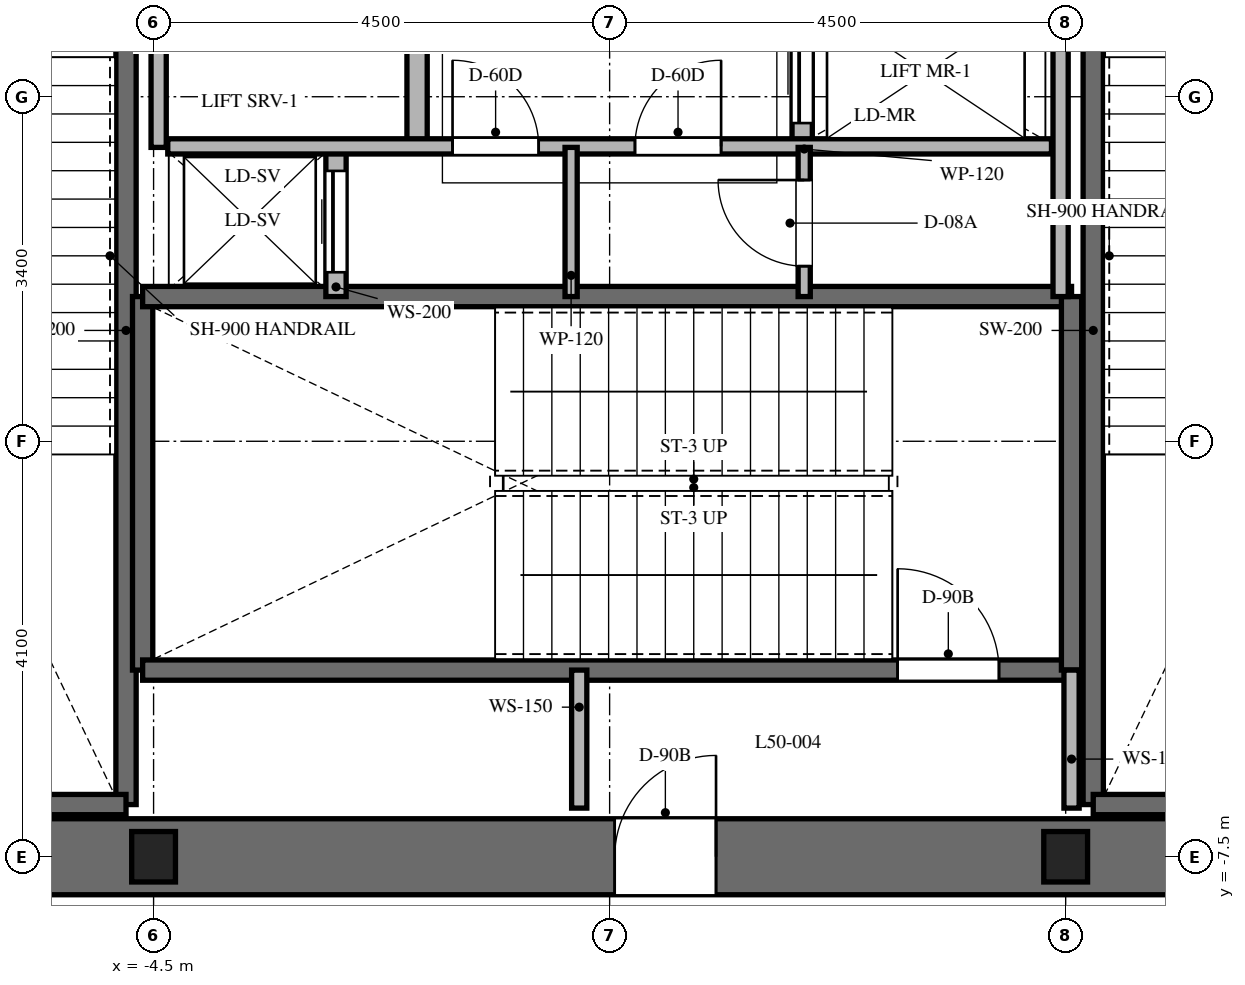
"""IFC4 building model, lengths in metres.
Left out: names, types, materials, properties, quantities, classifications, styles, units other than length and angle.
Written with IfcOpenShell. Run it as: python <this file> out.ifc"""

import sys

from ifc_helpers import new_model, si_unit, direction, frame, frame_2d, origin, origin_2d, place, context, subcontext, project, spatial, rectangle, i_section, extrude, element, fill, save


model = new_model("IFC4")
c1 = context("Model", 3, precision=1e-05, world=origin(), true_north=direction((0.0, 1.0)))
c2 = subcontext(c1, "Body", "Model", "MODEL_VIEW")
j1 = project(units=[si_unit("LENGTHUNIT", "METRE"), si_unit("PLANEANGLEUNIT", "RADIAN")], contexts=[c1])
p1 = place(None, origin())
s1 = spatial("IfcSite", under=j1, at=p1, CompositionType="ELEMENT")
p2 = place(p1, origin())
s2 = spatial("IfcBuilding", under=s1, at=p2, CompositionType="ELEMENT")
p3 = place(p2, frame((0.0, 0.0, 201.5)))
s3 = spatial("IfcBuildingStorey", under=s2, at=p3, CompositionType="ELEMENT", Elevation=201.5)
p4 = place(p3, frame((-9.375, -7.5, 0.0), z_axis=(0.0, 0.0, 1.0), x_axis=(1.0, 0.0, 0.0)))
e1 = element("IfcWall", 1, at=p4, inside=s3, PredefinedType="SHEAR", context=c2, shape_type="SweptSolid", body=[
    extrude(rectangle(XDim=18.75, YDim=0.75, at=frame_2d((9.375, 0.0))), origin(), (0.0, 0.0, 1.0), 5.0),
])
p5 = place(p4, frame((9.425, 0.0, 0.0)))
e2 = element("IfcOpeningElement", 2, at=p5, cuts=e1, PredefinedType="OPENING", context=c2, shape_type="SweptSolid", body=[
    extrude(rectangle(XDim=1.0, YDim=2.15, at=frame_2d((0.5, 1.075))), frame((0.0, 0.385, 0.0), z_axis=(0.0, -1.0, 0.0), x_axis=(1.0, 0.0, 0.0)), (0.0, 0.0, 1.0), 0.77),
])
p6 = place(p3, frame((-4.772, -6.985, 0.0), z_axis=(0.0, 0.0, 1.0), x_axis=(0.0, 1.0, 0.0)))
e3 = element("IfcWall", 3, at=p6, inside=s3, PredefinedType="SHEAR", context=c2, shape_type="SweptSolid", body=[
    extrude(rectangle(XDim=9.143, YDim=0.2, at=frame_2d((4.572, 0.0))), origin(), (0.0, 0.0, 1.0), 5.0),
])
p7 = place(p3, frame((-8.458, -6.985, 0.0), z_axis=(0.0, 0.0, 1.0), x_axis=(1.0, 0.0, 0.0)))
e4 = element("IfcWall", 4, at=p7, inside=s3, PredefinedType="SHEAR", context=c2, shape_type="SweptSolid", body=[
    extrude(rectangle(XDim=3.686, YDim=0.2, at=frame_2d((1.843, 0.0))), origin(), (0.0, 0.0, 1.0), 5.0),
])
p8 = place(p3, frame((4.772, -6.985, 0.0), z_axis=(0.0, 0.0, 1.0), x_axis=(0.0, 1.0, 0.0)))
e5 = element("IfcWall", 5, at=p8, inside=s3, PredefinedType="SHEAR", context=c2, shape_type="SweptSolid", body=[
    extrude(rectangle(XDim=9.143, YDim=0.2, at=frame_2d((4.572, 0.0))), origin(), (0.0, 0.0, 1.0), 5.0),
])
for number, where, z_axis, x_axis in (
    (6, (4.772, -6.985, 0.0), (0.0, 0.0, 1.0), (1.0, 0.0, 0.0)),
    (7, (-4.608, -5.658, 0.0), (0.0, 0.0, 1.0), (0.0, 1.0, 0.0)),
):
    element("IfcWall", number, at=place(p3, frame(where, z_axis=z_axis, x_axis=x_axis)), inside=s3, PredefinedType="SHEAR", context=c2, shape_type="SweptSolid", body=[
        extrude(rectangle(XDim=3.686, YDim=0.2, at=frame_2d((1.843, 0.0))), origin(), (0.0, 0.0, 1.0), 5.0),
    ])
p9 = place(p3, frame((-4.608, -5.658, 0.0), z_axis=(0.0, 0.0, 1.0), x_axis=(1.0, 0.0, 0.0)))
e8 = element("IfcWall", 8, at=p9, inside=s3, PredefinedType="SHEAR", context=c2, shape_type="SweptSolid", body=[
    extrude(rectangle(XDim=9.166, YDim=0.2, at=frame_2d((4.583, 0.0))), origin(), (0.0, 0.0, 1.0), 5.0),
])
p10 = place(p9, frame((7.45, 0.0, 0.0)))
e9 = element("IfcOpeningElement", 9, at=p10, cuts=e8, PredefinedType="OPENING", context=c2, shape_type="SweptSolid", body=[
    extrude(rectangle(XDim=1.0, YDim=2.15, at=frame_2d((0.5, 1.075))), frame((0.0, 0.11, 0.0), z_axis=(0.0, -1.0, 0.0), x_axis=(1.0, 0.0, 0.0)), (0.0, 0.0, 1.0), 0.22),
])
p11 = place(p3, frame((-4.608, -1.972, 0.0), z_axis=(0.0, 0.0, 1.0), x_axis=(1.0, 0.0, 0.0)))
e10 = element("IfcWall", 10, at=p11, inside=s3, PredefinedType="SHEAR", context=c2, shape_type="SweptSolid", body=[
    extrude(rectangle(XDim=9.166, YDim=0.2, at=frame_2d((4.583, 0.0))), origin(), (0.0, 0.0, 1.0), 5.0),
])
p12 = place(p3, frame((4.558, -5.658, 0.0), z_axis=(0.0, 0.0, 1.0), x_axis=(0.0, 1.0, 0.0)))
e11 = element("IfcWall", 11, at=p12, inside=s3, PredefinedType="SHEAR", context=c2, shape_type="SweptSolid", body=[
    extrude(rectangle(XDim=3.686, YDim=0.2, at=frame_2d((1.843, 0.0))), origin(), (0.0, 0.0, 1.0), 5.0),
])
for number, where, z_axis, x_axis in (
    (12, (-4.5, -7.5, 0.0), (0.0, 0.0, 1.0), (1.0, 0.0, 0.0)),
    (13, (4.5, -7.5, 0.0), (0.0, 0.0, 1.0), (1.0, 0.0, 0.0)),
):
    element("IfcColumn", number, at=place(p3, frame(where, z_axis=z_axis, x_axis=x_axis)), inside=s3, PredefinedType="COLUMN", context=c2, shape_type="SweptSolid", body=[
        extrude(i_section(OverallWidth=0.432, OverallDepth=0.498, WebThickness=0.056, FlangeThickness=0.089, at=origin_2d()), origin(), (0.0, 0.0, 1.0), 5.0),
    ])
for number, where, z_axis, x_axis in (
    (14, (-0.3, -7.02, 0.0), (0.0, 0.0, 1.0), (0.0, 1.0, 0.0)),
    (15, (4.558, -7.02, 0.0), (0.0, 0.0, 1.0), (0.0, 1.0, 0.0)),
):
    element("IfcWall", number, at=place(p3, frame(where, z_axis=z_axis, x_axis=x_axis)), inside=s3, PredefinedType="PARTITIONING", context=c2, shape_type="SweptSolid", body=[
        extrude(rectangle(XDim=1.362, YDim=0.15, at=frame_2d((0.681, 0.0))), origin(), (0.0, 0.0, 1.0), 4.7),
    ])
p13 = place(p3, frame((-2.7, -1.972, 0.0), z_axis=(0.0, 0.0, 1.0), x_axis=(0.0, 1.0, 0.0)))
e16 = element("IfcWall", 16, at=p13, inside=s3, PredefinedType="PARTITIONING", context=c2, shape_type="SweptSolid", body=[
    extrude(rectangle(XDim=1.472, YDim=0.2, at=frame_2d((0.736, 0.0))), origin(), (0.0, 0.0, 1.0), 4.7),
])
p14 = place(p13, frame((0.24, 0.0, 0.0)))
e17 = element("IfcOpeningElement", 17, at=p14, cuts=e16, PredefinedType="OPENING", context=c2, shape_type="SweptSolid", body=[
    extrude(rectangle(XDim=1.0, YDim=2.2, at=frame_2d((0.5, 1.1))), frame((0.0, 0.11, 0.0), z_axis=(0.0, -1.0, 0.0), x_axis=(1.0, 0.0, 0.0)), (0.0, 0.0, 1.0), 0.22),
])
p15 = place(p3, frame((-4.45, -0.5, 0.0), z_axis=(0.0, 0.0, 1.0), x_axis=(0.0, 1.0, 0.0)))
e18 = element("IfcWall", 18, at=p15, inside=s3, PredefinedType="PARTITIONING", context=c2, shape_type="SweptSolid", body=[
    extrude(rectangle(XDim=2.75, YDim=0.15, at=frame_2d((1.375, 0.0))), origin(), (0.0, 0.0, 1.0), 4.7),
])
p16 = place(p3, frame((4.45, -1.972, 0.0), z_axis=(0.0, 0.0, 1.0), x_axis=(0.0, 1.0, 0.0)))
e19 = element("IfcWall", 19, at=p16, inside=s3, PredefinedType="PARTITIONING", context=c2, shape_type="SweptSolid", body=[
    extrude(rectangle(XDim=4.222, YDim=0.15, at=frame_2d((2.111, 0.0))), origin(), (0.0, 0.0, 1.0), 4.7),
])
p17 = place(p3, frame((-1.9, -0.5, 0.0), z_axis=(0.0, 0.0, 1.0), x_axis=(0.0, 1.0, 0.0)))
e20 = element("IfcWall", 20, at=p17, inside=s3, PredefinedType="PARTITIONING", context=c2, shape_type="SweptSolid", body=[
    extrude(rectangle(XDim=4.44, YDim=0.2, at=frame_2d((2.22, 0.0))), origin(), (0.0, 0.0, 1.0), 4.7),
])
p18 = place(p17, frame((1.5, 0.0, 0.0)))
e21 = element("IfcOpeningElement", 21, at=p18, cuts=e20, PredefinedType="OPENING", context=c2, shape_type="SweptSolid", body=[
    extrude(rectangle(XDim=0.85, YDim=2.03, at=frame_2d((0.425, 1.015))), frame((0.0, 0.11, 0.0), z_axis=(0.0, -1.0, 0.0), x_axis=(1.0, 0.0, 0.0)), (0.0, 0.0, 1.0), 0.22),
])
p19 = place(p3, frame((1.9, -0.5, 0.0), z_axis=(0.0, 0.0, 1.0), x_axis=(0.0, 1.0, 0.0)))
e22 = element("IfcWall", 22, at=p19, inside=s3, PredefinedType="PARTITIONING", context=c2, shape_type="SweptSolid", body=[
    extrude(rectangle(XDim=4.44, YDim=0.2, at=frame_2d((2.22, 0.0))), origin(), (0.0, 0.0, 1.0), 4.7),
])
p20 = place(p19, frame((0.24, 0.0, 0.0)))
e23 = element("IfcOpeningElement", 23, at=p20, cuts=e22, PredefinedType="OPENING", context=c2, shape_type="SweptSolid", body=[
    extrude(rectangle(XDim=1.0, YDim=2.2, at=frame_2d((0.5, 1.1))), frame((0.0, 0.11, 0.0), z_axis=(0.0, -1.0, 0.0), x_axis=(1.0, 0.0, 0.0)), (0.0, 0.0, 1.0), 0.22),
])
p21 = place(p19, frame((1.72, 0.0, 0.0)))
e24 = element("IfcOpeningElement", 24, at=p21, cuts=e22, PredefinedType="OPENING", context=c2, shape_type="SweptSolid", body=[
    extrude(rectangle(XDim=1.0, YDim=2.2, at=frame_2d((0.5, 1.1))), frame((0.0, 0.11, 0.0), z_axis=(0.0, -1.0, 0.0), x_axis=(1.0, 0.0, 0.0)), (0.0, 0.0, 1.0), 0.22),
])
p22 = place(p19, frame((3.2, 0.0, 0.0)))
e25 = element("IfcOpeningElement", 25, at=p22, cuts=e22, PredefinedType="OPENING", context=c2, shape_type="SweptSolid", body=[
    extrude(rectangle(XDim=1.0, YDim=2.2, at=frame_2d((0.5, 1.1))), frame((0.0, 0.11, 0.0), z_axis=(0.0, -1.0, 0.0), x_axis=(1.0, 0.0, 0.0)), (0.0, 0.0, 1.0), 0.22),
])
p23 = place(p3, frame((-4.36, -0.49, 0.0), z_axis=(0.0, 0.0, 1.0), x_axis=(1.0, 0.0, 0.0)))
e26 = element("IfcWall", 26, at=p23, inside=s3, PredefinedType="PARTITIONING", context=c2, shape_type="SweptSolid", body=[
    extrude(rectangle(XDim=8.72, YDim=0.15, at=frame_2d((4.36, 0.0))), origin(), (0.0, 0.0, 1.0), 4.7),
])
p24 = place(p23, frame((2.81, 0.0, 0.0)))
e27 = element("IfcOpeningElement", 27, at=p24, cuts=e26, PredefinedType="OPENING", context=c2, shape_type="SweptSolid", body=[
    extrude(rectangle(XDim=0.85, YDim=2.03, at=frame_2d((0.425, 1.015))), frame((0.0, 0.085, 0.0), z_axis=(0.0, -1.0, 0.0), x_axis=(1.0, 0.0, 0.0)), (0.0, 0.0, 1.0), 0.17),
])
p25 = place(p23, frame((4.61, 0.0, 0.0)))
e28 = element("IfcOpeningElement", 28, at=p25, cuts=e26, PredefinedType="OPENING", context=c2, shape_type="SweptSolid", body=[
    extrude(rectangle(XDim=0.85, YDim=2.03, at=frame_2d((0.425, 1.015))), frame((0.0, 0.085, 0.0), z_axis=(0.0, -1.0, 0.0), x_axis=(1.0, 0.0, 0.0)), (0.0, 0.0, 1.0), 0.17),
])
p26 = place(p3, frame((-0.38, -1.972, 0.0), z_axis=(0.0, 0.0, 1.0), x_axis=(0.0, 1.0, 0.0)))
e29 = element("IfcWall", 29, at=p26, inside=s3, PredefinedType="PARTITIONING", context=c2, shape_type="SweptSolid", body=[
    extrude(rectangle(XDim=1.472, YDim=0.12, at=frame_2d((0.736, 0.0))), origin(), (0.0, 0.0, 1.0), 4.7),
])
p27 = place(p3, frame((1.92, -1.972, 0.0), z_axis=(0.0, 0.0, 1.0), x_axis=(0.0, 1.0, 0.0)))
e30 = element("IfcWall", 30, at=p27, inside=s3, PredefinedType="PARTITIONING", context=c2, shape_type="SweptSolid", body=[
    extrude(rectangle(XDim=1.472, YDim=0.12, at=frame_2d((0.736, 0.0))), origin(), (0.0, 0.0, 1.0), 4.7),
])
p28 = place(p27, frame((0.3, 0.0, 0.0)))
e31 = element("IfcOpeningElement", 31, at=p28, cuts=e30, PredefinedType="OPENING", context=c2, shape_type="SweptSolid", body=[
    extrude(rectangle(XDim=0.85, YDim=2.03, at=frame_2d((0.425, 1.015))), frame((0.0, 0.07, 0.0), z_axis=(0.0, -1.0, 0.0), x_axis=(1.0, 0.0, 0.0)), (0.0, 0.0, 1.0), 0.14),
])
p29 = place(p10, origin())
e32 = element("IfcDoor", 32, at=p29, inside=s3, OperationType="SINGLE_SWING_LEFT", PredefinedType="DOOR", context=c2, shape_type="SweptSolid", body=[
    extrude(rectangle(XDim=1.0, YDim=2.15, at=frame_2d((0.5, 1.075))), frame((0.0, 0.025, 0.0), z_axis=(0.0, -1.0, 0.0), x_axis=(1.0, 0.0, 0.0)), (0.0, 0.0, 1.0), 0.05),
])
fill(e9, e32)
p30 = place(p5, origin())
e33 = element("IfcDoor", 33, at=p30, inside=s3, OperationType="SINGLE_SWING_RIGHT", PredefinedType="DOOR", context=c2, shape_type="SweptSolid", body=[
    extrude(rectangle(XDim=1.0, YDim=2.15, at=frame_2d((0.5, 1.075))), frame((0.0, 0.025, 0.0), z_axis=(0.0, -1.0, 0.0), x_axis=(1.0, 0.0, 0.0)), (0.0, 0.0, 1.0), 0.05),
])
fill(e2, e33)
p31 = place(p14, origin())
e34 = element("IfcDoor", 34, at=p31, inside=s3, OperationType="SLIDING_TO_LEFT", PredefinedType="DOOR", context=c2, shape_type="SweptSolid", body=[
    extrude(rectangle(XDim=1.0, YDim=2.2, at=frame_2d((0.5, 1.1))), frame((0.0, 0.025, 0.0), z_axis=(0.0, -1.0, 0.0), x_axis=(1.0, 0.0, 0.0)), (0.0, 0.0, 1.0), 0.05),
])
fill(e17, e34)
p32 = place(p20, origin())
e35 = element("IfcDoor", 35, at=p32, inside=s3, OperationType="SLIDING_TO_RIGHT", PredefinedType="DOOR", context=c2, shape_type="SweptSolid", body=[
    extrude(rectangle(XDim=1.0, YDim=2.2, at=frame_2d((0.5, 1.1))), frame((0.0, 0.025, 0.0), z_axis=(0.0, -1.0, 0.0), x_axis=(1.0, 0.0, 0.0)), (0.0, 0.0, 1.0), 0.05),
])
fill(e23, e35)
p33 = place(p24, origin())
e36 = element("IfcDoor", 36, at=p33, inside=s3, OperationType="SINGLE_SWING_LEFT", PredefinedType="DOOR", context=c2, shape_type="SweptSolid", body=[
    extrude(rectangle(XDim=0.85, YDim=2.03, at=frame_2d((0.425, 1.015))), frame((0.0, 0.025, 0.0), z_axis=(0.0, -1.0, 0.0), x_axis=(1.0, 0.0, 0.0)), (0.0, 0.0, 1.0), 0.05),
])
fill(e27, e36)
p34 = place(p25, origin())
e37 = element("IfcDoor", 37, at=p34, inside=s3, OperationType="SINGLE_SWING_RIGHT", PredefinedType="DOOR", context=c2, shape_type="SweptSolid", body=[
    extrude(rectangle(XDim=0.85, YDim=2.03, at=frame_2d((0.425, 1.015))), frame((0.0, 0.025, 0.0), z_axis=(0.0, -1.0, 0.0), x_axis=(1.0, 0.0, 0.0)), (0.0, 0.0, 1.0), 0.05),
])
fill(e28, e37)
p35 = place(p28, origin())
e38 = element("IfcDoor", 38, at=p35, inside=s3, OperationType="SINGLE_SWING_RIGHT", PredefinedType="DOOR", context=c2, shape_type="SweptSolid", body=[
    extrude(rectangle(XDim=0.85, YDim=2.03, at=frame_2d((0.425, 1.015))), frame((0.0, 0.025, 0.0), z_axis=(0.0, -1.0, 0.0), x_axis=(1.0, 0.0, 0.0)), (0.0, 0.0, 1.0), 0.05),
])
fill(e31, e38)
save(model, sys.argv[1])
